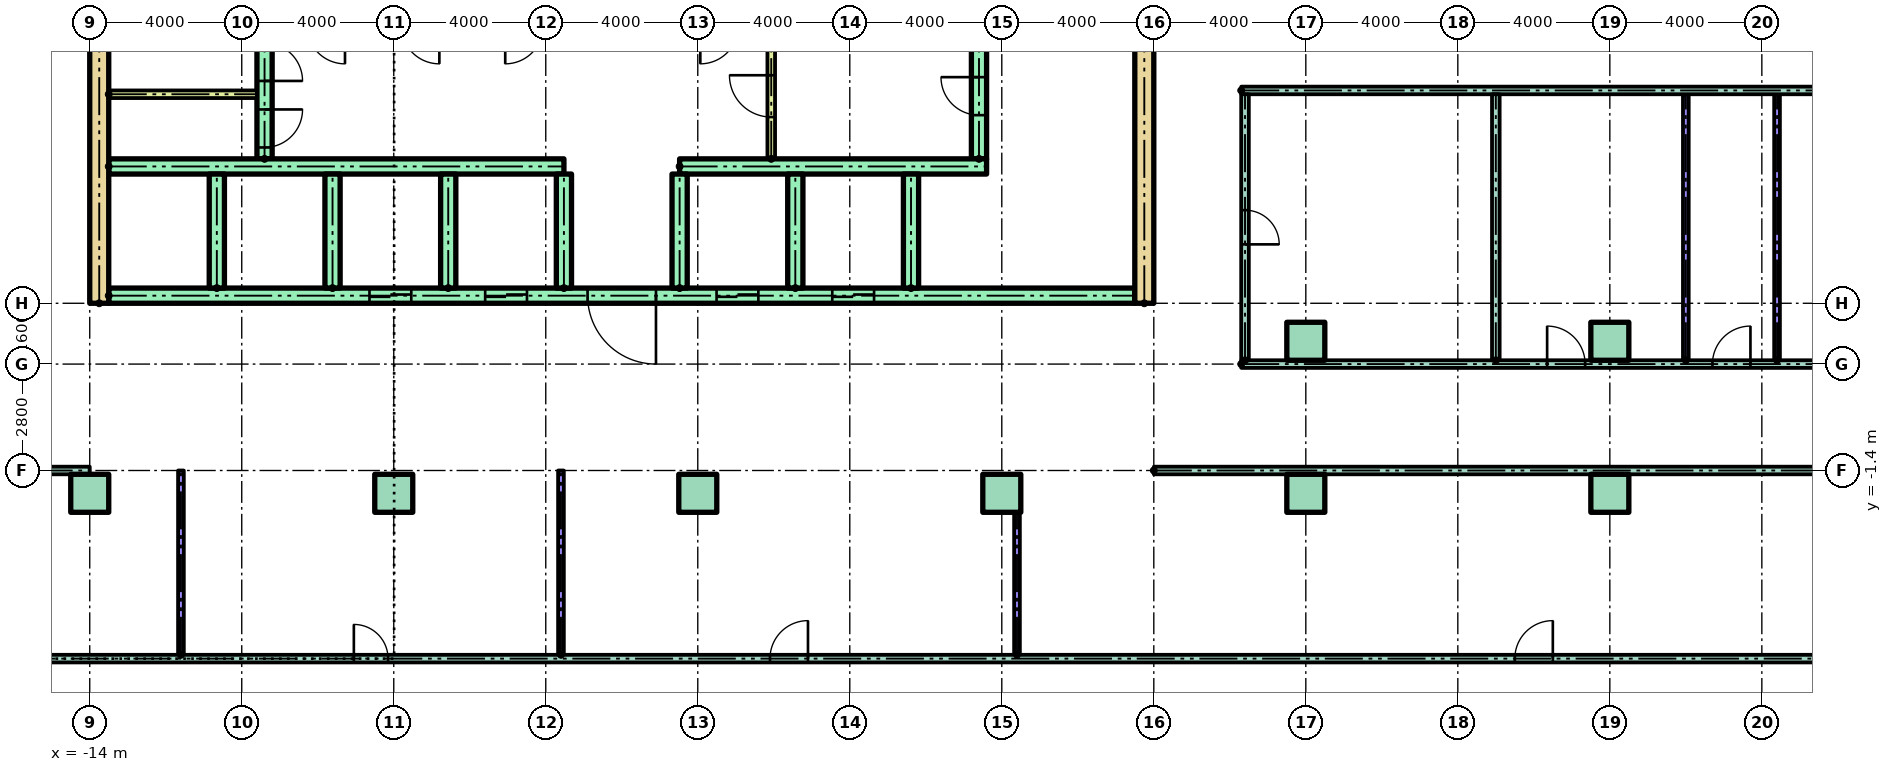
"""IFC4 building model, lengths in metres.
Left out: names, types, materials, properties, quantities, classifications, styles, units other than length and angle.
Written with IfcOpenShell. Run it as: python <this file> out.ifc"""

import sys

from ifc_helpers import new_model, si_unit, direction, frame, frame_2d, origin, origin_2d, place, context, subcontext, project, spatial, rectangle, extrude, element, fill, save


model = new_model("IFC4")
c1 = context("Model", 3, precision=1e-05, world=origin(), true_north=direction((0.0, 1.0)))
c2 = subcontext(c1, "Body", "Model", "MODEL_VIEW")
j1 = project(units=[si_unit("LENGTHUNIT", "METRE"), si_unit("PLANEANGLEUNIT", "RADIAN")], contexts=[c1])
p1 = place(None, origin())
s1 = spatial("IfcSite", under=j1, at=p1, CompositionType="ELEMENT")
p2 = place(p1, origin())
s2 = spatial("IfcBuilding", under=s1, at=p2, CompositionType="ELEMENT")
p3 = place(p2, frame((0.0, 0.0, 18.0)))
s3 = spatial("IfcBuildingStorey", under=s2, at=p3, CompositionType="ELEMENT", Elevation=18.0)
for number, where in (
    (1, (-14.0, -2.0, 0.0)),
    (2, (-6.0, -2.0, 0.0)),
    (3, (2.0, -2.0, 0.0)),
    (4, (10.0, -2.0, 0.0)),
    (5, (18.0, -2.0, 0.0)),
    (6, (26.0, -2.0, 0.0)),
    (7, (18.0, 2.0, 0.0)),
    (8, (26.0, 2.0, 0.0)),
):
    element("IfcColumn", number, at=place(p3, frame(where)), inside=s3, PredefinedType="COLUMN", context=c2, shape_type="SweptSolid", body=[
        extrude(rectangle(XDim=1.0, YDim=1.0, at=origin_2d()), origin(), (0.0, 0.0, 1.0), 4.0),
    ])
for number, where, z_axis, x_axis in (
    (9, (-13.75, 3.0, 0.0), (0.0, 0.0, 1.0), (0.0, 1.0, 0.0)),
    (10, (13.75, 3.0, 0.0), (0.0, 0.0, 1.0), (0.0, 1.0, 0.0)),
):
    element("IfcWall", number, at=place(p3, frame(where, z_axis=z_axis, x_axis=x_axis)), inside=s3, PredefinedType="SHEAR", context=c2, shape_type="SweptSolid", body=[
        extrude(rectangle(XDim=17.0, YDim=0.5, at=frame_2d((8.5, 0.0))), origin(), (0.0, 0.0, 1.0), 3.7),
    ])
p4 = place(p3, frame((-9.4, 6.8, 0.0), z_axis=(0.0, 0.0, 1.0), x_axis=(0.0, 1.0, 0.0)))
e11 = element("IfcWall", 11, at=p4, inside=s3, PredefinedType="SHEAR", context=c2, shape_type="SweptSolid", body=[
    extrude(rectangle(XDim=12.7, YDim=0.4, at=frame_2d((6.35, 0.0))), origin(), (0.0, 0.0, 1.0), 3.7),
])
p5 = place(p4, frame((0.3, 0.0, 0.0)))
e12 = element("IfcOpeningElement", 12, at=p5, cuts=e11, PredefinedType="OPENING", context=c2, shape_type="SweptSolid", body=[
    extrude(rectangle(XDim=1.0, YDim=2.1, at=frame_2d((0.5, 1.05))), frame((0.0, 0.21, 0.0), z_axis=(0.0, -1.0, 0.0), x_axis=(1.0, 0.0, 0.0)), (0.0, 0.0, 1.0), 0.42),
])
p6 = place(p4, frame((2.05, 0.0, 0.0)))
e13 = element("IfcOpeningElement", 13, at=p6, cuts=e11, PredefinedType="OPENING", context=c2, shape_type="SweptSolid", body=[
    extrude(rectangle(XDim=1.0, YDim=2.1, at=frame_2d((0.5, 1.05))), frame((0.0, 0.21, 0.0), z_axis=(0.0, -1.0, 0.0), x_axis=(1.0, 0.0, 0.0)), (0.0, 0.0, 1.0), 0.42),
])
p7 = place(p4, frame((7.925, 0.0, 0.0)))
e14 = element("IfcOpeningElement", 14, at=p7, cuts=e11, PredefinedType="OPENING", context=c2, shape_type="SweptSolid", body=[
    extrude(rectangle(XDim=1.0, YDim=2.1, at=frame_2d((0.5, 1.05))), frame((0.0, 0.21, 0.0), z_axis=(0.0, -1.0, 0.0), x_axis=(1.0, 0.0, 0.0)), (0.0, 0.0, 1.0), 0.42),
])
p8 = place(p3, frame((9.4, 6.8, 0.0), z_axis=(0.0, 0.0, 1.0), x_axis=(0.0, 1.0, 0.0)))
e15 = element("IfcWall", 15, at=p8, inside=s3, PredefinedType="SHEAR", context=c2, shape_type="SweptSolid", body=[
    extrude(rectangle(XDim=12.7, YDim=0.4, at=frame_2d((6.35, 0.0))), origin(), (0.0, 0.0, 1.0), 3.7),
])
p9 = place(p8, frame((1.15, 0.0, 0.0)))
e16 = element("IfcOpeningElement", 16, at=p9, cuts=e15, PredefinedType="OPENING", context=c2, shape_type="SweptSolid", body=[
    extrude(rectangle(XDim=1.0, YDim=2.1, at=frame_2d((0.5, 1.05))), frame((0.0, 0.21, 0.0), z_axis=(0.0, -1.0, 0.0), x_axis=(1.0, 0.0, 0.0)), (0.0, 0.0, 1.0), 0.42),
])
p10 = place(p8, frame((7.925, 0.0, 0.0)))
e17 = element("IfcOpeningElement", 17, at=p10, cuts=e15, PredefinedType="OPENING", context=c2, shape_type="SweptSolid", body=[
    extrude(rectangle(XDim=1.0, YDim=2.1, at=frame_2d((0.5, 1.05))), frame((0.0, 0.21, 0.0), z_axis=(0.0, -1.0, 0.0), x_axis=(1.0, 0.0, 0.0)), (0.0, 0.0, 1.0), 0.42),
])
p11 = place(p3, frame((-13.5, 3.2, 0.0)))
e18 = element("IfcWall", 18, at=p11, inside=s3, PredefinedType="SHEAR", context=c2, shape_type="SweptSolid", body=[
    extrude(rectangle(XDim=27.0, YDim=0.4, at=frame_2d((13.5, 0.0))), origin(), (0.0, 0.0, 1.0), 3.7),
])
p12 = place(p11, frame((6.861, 0.0, 0.0)))
e19 = element("IfcOpeningElement", 19, at=p12, cuts=e18, PredefinedType="OPENING", context=c2, shape_type="SweptSolid", body=[
    extrude(rectangle(XDim=1.1, YDim=2.1, at=frame_2d((0.55, 1.05))), frame((0.0, 0.21, 0.0), z_axis=(0.0, -1.0, 0.0), x_axis=(1.0, 0.0, 0.0)), (0.0, 0.0, 1.0), 0.42),
])
p13 = place(p11, frame((9.906, 0.0, 0.0)))
e20 = element("IfcOpeningElement", 20, at=p13, cuts=e18, PredefinedType="OPENING", context=c2, shape_type="SweptSolid", body=[
    extrude(rectangle(XDim=1.1, YDim=2.1, at=frame_2d((0.55, 1.05))), frame((0.0, 0.21, 0.0), z_axis=(0.0, -1.0, 0.0), x_axis=(1.0, 0.0, 0.0)), (0.0, 0.0, 1.0), 0.42),
])
p14 = place(p11, frame((15.994, 0.0, 0.0)))
e21 = element("IfcOpeningElement", 21, at=p14, cuts=e18, PredefinedType="OPENING", context=c2, shape_type="SweptSolid", body=[
    extrude(rectangle(XDim=1.1, YDim=2.1, at=frame_2d((0.55, 1.05))), frame((0.0, 0.21, 0.0), z_axis=(0.0, -1.0, 0.0), x_axis=(1.0, 0.0, 0.0)), (0.0, 0.0, 1.0), 0.42),
])
p15 = place(p11, frame((19.039, 0.0, 0.0)))
e22 = element("IfcOpeningElement", 22, at=p15, cuts=e18, PredefinedType="OPENING", context=c2, shape_type="SweptSolid", body=[
    extrude(rectangle(XDim=1.1, YDim=2.1, at=frame_2d((0.55, 1.05))), frame((0.0, 0.21, 0.0), z_axis=(0.0, -1.0, 0.0), x_axis=(1.0, 0.0, 0.0)), (0.0, 0.0, 1.0), 0.42),
])
p16 = place(p11, frame((12.6, 0.0, 0.0)))
e23 = element("IfcOpeningElement", 23, at=p16, cuts=e18, PredefinedType="OPENING", context=c2, shape_type="SweptSolid", body=[
    extrude(rectangle(XDim=1.8, YDim=2.1, at=frame_2d((0.9, 1.05))), frame((0.0, 0.21, 0.0), z_axis=(0.0, -1.0, 0.0), x_axis=(1.0, 0.0, 0.0)), (0.0, 0.0, 1.0), 0.42),
])
p17 = place(p3, frame((-13.5, 6.6, 0.0)))
e24 = element("IfcWall", 24, at=p17, inside=s3, PredefinedType="SHEAR", context=c2, shape_type="SweptSolid", body=[
    extrude(rectangle(XDim=11.978, YDim=0.4, at=frame_2d((5.989, 0.0))), origin(), (0.0, 0.0, 1.0), 3.7),
])
p18 = place(p3, frame((1.522, 6.6, 0.0)))
e25 = element("IfcWall", 25, at=p18, inside=s3, PredefinedType="SHEAR", context=c2, shape_type="SweptSolid", body=[
    extrude(rectangle(XDim=8.078, YDim=0.4, at=frame_2d((4.039, 0.0))), origin(), (0.0, 0.0, 1.0), 3.7),
])
for number, where, z_axis, x_axis in (
    (26, (-10.656, 3.4, 0.0), (0.0, 0.0, 1.0), (0.0, 1.0, 0.0)),
    (27, (-7.611, 3.4, 0.0), (0.0, 0.0, 1.0), (0.0, 1.0, 0.0)),
    (28, (-4.567, 3.4, 0.0), (0.0, 0.0, 1.0), (0.0, 1.0, 0.0)),
    (29, (-1.522, 3.4, 0.0), (0.0, 0.0, 1.0), (0.0, 1.0, 0.0)),
    (30, (1.522, 3.4, 0.0), (0.0, 0.0, 1.0), (0.0, 1.0, 0.0)),
    (31, (4.567, 3.4, 0.0), (0.0, 0.0, 1.0), (0.0, 1.0, 0.0)),
    (32, (7.611, 3.4, 0.0), (0.0, 0.0, 1.0), (0.0, 1.0, 0.0)),
):
    element("IfcWall", number, at=place(p3, frame(where, z_axis=z_axis, x_axis=x_axis)), inside=s3, PredefinedType="SHEAR", context=c2, shape_type="SweptSolid", body=[
        extrude(rectangle(XDim=3.0, YDim=0.4, at=frame_2d((1.5, 0.0))), origin(), (0.0, 0.0, 1.0), 3.7),
    ])
p19 = place(p3, frame((3.933, 6.8, 0.0), z_axis=(0.0, 0.0, 1.0), x_axis=(0.0, 1.0, 0.0)))
e33 = element("IfcWall", 33, at=p19, inside=s3, PredefinedType="PARTITIONING", context=c2, shape_type="SweptSolid", body=[
    extrude(rectangle(XDim=3.3, YDim=0.2, at=frame_2d((1.65, 0.0))), origin(), (0.0, 0.0, 1.0), 3.7),
])
p20 = place(p19, frame((1.1, 0.0, 0.0)))
e34 = element("IfcOpeningElement", 34, at=p20, cuts=e33, PredefinedType="OPENING", context=c2, shape_type="SweptSolid", body=[
    extrude(rectangle(XDim=1.1, YDim=2.1, at=frame_2d((0.55, 1.05))), frame((0.0, 0.11, 0.0), z_axis=(0.0, -1.0, 0.0), x_axis=(1.0, 0.0, 0.0)), (0.0, 0.0, 1.0), 0.22),
])
p21 = place(p3, frame((-13.5, 8.5, 0.0)))
e35 = element("IfcWall", 35, at=p21, inside=s3, PredefinedType="PARTITIONING", context=c2, shape_type="SweptSolid", body=[
    extrude(rectangle(XDim=3.9, YDim=0.2, at=frame_2d((1.95, 0.0))), origin(), (0.0, 0.0, 1.0), 3.7),
])
p22 = place(p3, frame((-37.6, -6.35, 0.0)))
e36 = element("IfcWall", 36, at=p22, inside=s3, PredefinedType="PARTITIONING", context=c2, shape_type="SweptSolid", body=[
    extrude(rectangle(XDim=75.2, YDim=0.2, at=frame_2d((37.6, 0.0))), origin(), (0.0, 0.0, 1.0), 3.7),
])
p23 = place(p22, frame((7.5, 0.0, 0.0)))
e37 = element("IfcOpeningElement", 37, at=p23, cuts=e36, PredefinedType="OPENING", context=c2, shape_type="SweptSolid", body=[
    extrude(rectangle(XDim=1.0, YDim=2.1, at=frame_2d((0.5, 1.05))), frame((0.0, 0.11, 0.0), z_axis=(0.0, -1.0, 0.0), x_axis=(1.0, 0.0, 0.0)), (0.0, 0.0, 1.0), 0.22),
])
p24 = place(p22, frame((20.55, 0.0, 0.0)))
e38 = element("IfcOpeningElement", 38, at=p24, cuts=e36, PredefinedType="OPENING", context=c2, shape_type="SweptSolid", body=[
    extrude(rectangle(XDim=0.9, YDim=2.1, at=frame_2d((0.45, 1.05))), frame((0.0, 0.11, 0.0), z_axis=(0.0, -1.0, 0.0), x_axis=(1.0, 0.0, 0.0)), (0.0, 0.0, 1.0), 0.22),
])
p25 = place(p22, frame((30.55, 0.0, 0.0)))
e39 = element("IfcOpeningElement", 39, at=p25, cuts=e36, PredefinedType="OPENING", context=c2, shape_type="SweptSolid", body=[
    extrude(rectangle(XDim=0.9, YDim=2.1, at=frame_2d((0.45, 1.05))), frame((0.0, 0.11, 0.0), z_axis=(0.0, -1.0, 0.0), x_axis=(1.0, 0.0, 0.0)), (0.0, 0.0, 1.0), 0.22),
])
p26 = place(p22, frame((41.5, 0.0, 0.0)))
e40 = element("IfcOpeningElement", 40, at=p26, cuts=e36, PredefinedType="OPENING", context=c2, shape_type="SweptSolid", body=[
    extrude(rectangle(XDim=1.0, YDim=2.1, at=frame_2d((0.5, 1.05))), frame((0.0, 0.11, 0.0), z_axis=(0.0, -1.0, 0.0), x_axis=(1.0, 0.0, 0.0)), (0.0, 0.0, 1.0), 0.22),
])
p27 = place(p22, frame((61.1, 0.0, 0.0)))
e41 = element("IfcOpeningElement", 41, at=p27, cuts=e36, PredefinedType="OPENING", context=c2, shape_type="SweptSolid", body=[
    extrude(rectangle(XDim=1.0, YDim=2.1, at=frame_2d((0.5, 1.05))), frame((0.0, 0.11, 0.0), z_axis=(0.0, -1.0, 0.0), x_axis=(1.0, 0.0, 0.0)), (0.0, 0.0, 1.0), 0.22),
])
for number, where in (
    (42, (-36.9, -1.4, 0.0)),
    (43, (14.0, -1.4, 0.0)),
):
    element("IfcWall", number, at=place(p3, frame(where)), inside=s3, PredefinedType="PARTITIONING", context=c2, shape_type="SweptSolid", body=[
        extrude(rectangle(XDim=22.9, YDim=0.2, at=frame_2d((11.45, 0.0))), origin(), (0.0, 0.0, 1.0), 3.7),
    ])
p28 = place(p3, frame((16.3, 1.4, 0.0)))
e44 = element("IfcWall", 44, at=p28, inside=s3, PredefinedType="PARTITIONING", context=c2, shape_type="SweptSolid", body=[
    extrude(rectangle(XDim=20.6, YDim=0.2, at=frame_2d((10.3, 0.0))), origin(), (0.0, 0.0, 1.0), 3.7),
])
p29 = place(p28, frame((8.05, 0.0, 0.0)))
e45 = element("IfcOpeningElement", 45, at=p29, cuts=e44, PredefinedType="OPENING", context=c2, shape_type="SweptSolid", body=[
    extrude(rectangle(XDim=1.0, YDim=2.1, at=frame_2d((0.5, 1.05))), frame((0.0, 0.11, 0.0), z_axis=(0.0, -1.0, 0.0), x_axis=(1.0, 0.0, 0.0)), (0.0, 0.0, 1.0), 0.22),
])
p30 = place(p28, frame((12.4, 0.0, 0.0)))
e46 = element("IfcOpeningElement", 46, at=p30, cuts=e44, PredefinedType="OPENING", context=c2, shape_type="SweptSolid", body=[
    extrude(rectangle(XDim=1.0, YDim=2.1, at=frame_2d((0.5, 1.05))), frame((0.0, 0.11, 0.0), z_axis=(0.0, -1.0, 0.0), x_axis=(1.0, 0.0, 0.0)), (0.0, 0.0, 1.0), 0.22),
])
p31 = place(p28, frame((16.05, 0.0, 0.0)))
e47 = element("IfcOpeningElement", 47, at=p31, cuts=e44, PredefinedType="OPENING", context=c2, shape_type="SweptSolid", body=[
    extrude(rectangle(XDim=1.0, YDim=2.1, at=frame_2d((0.5, 1.05))), frame((0.0, 0.11, 0.0), z_axis=(0.0, -1.0, 0.0), x_axis=(1.0, 0.0, 0.0)), (0.0, 0.0, 1.0), 0.22),
])
p32 = place(p3, frame((16.3, 8.6, 0.0)))
e48 = element("IfcWall", 48, at=p32, inside=s3, PredefinedType="PARTITIONING", context=c2, shape_type="SweptSolid", body=[
    extrude(rectangle(XDim=21.3, YDim=0.2, at=frame_2d((10.65, 0.0))), origin(), (0.0, 0.0, 1.0), 3.7),
])
for number, where, z_axis, x_axis in (
    (49, (-11.6, -6.25, 0.0), (0.0, 0.0, 1.0), (0.0, 1.0, 0.0)),
    (50, (-1.6, -6.25, 0.0), (0.0, 0.0, 1.0), (0.0, 1.0, 0.0)),
):
    element("IfcWall", number, at=place(p3, frame(where, z_axis=z_axis, x_axis=x_axis)), inside=s3, PredefinedType="PARTITIONING", context=c2, shape_type="SweptSolid", body=[
        extrude(rectangle(XDim=4.85, YDim=0.15, at=frame_2d((2.425, 0.0))), origin(), (0.0, 0.0, 1.0), 3.7),
    ])
p33 = place(p3, frame((10.4, -6.25, 0.0), z_axis=(0.0, 0.0, 1.0), x_axis=(0.0, 1.0, 0.0)))
e51 = element("IfcWall", 51, at=p33, inside=s3, PredefinedType="PARTITIONING", context=c2, shape_type="SweptSolid", body=[
    extrude(rectangle(XDim=3.75, YDim=0.15, at=frame_2d((1.875, 0.0))), origin(), (0.0, 0.0, 1.0), 3.7),
])
p34 = place(p3, frame((16.4, 1.5, 0.0), z_axis=(0.0, 0.0, 1.0), x_axis=(0.0, 1.0, 0.0)))
e52 = element("IfcWall", 52, at=p34, inside=s3, PredefinedType="PARTITIONING", context=c2, shape_type="SweptSolid", body=[
    extrude(rectangle(XDim=7.0, YDim=0.2, at=frame_2d((3.5, 0.0))), origin(), (0.0, 0.0, 1.0), 3.7),
])
p35 = place(p34, frame((3.05, 0.0, 0.0)))
e53 = element("IfcOpeningElement", 53, at=p35, cuts=e52, PredefinedType="OPENING", context=c2, shape_type="SweptSolid", body=[
    extrude(rectangle(XDim=0.9, YDim=2.1, at=frame_2d((0.45, 1.05))), frame((0.0, 0.11, 0.0), z_axis=(0.0, -1.0, 0.0), x_axis=(1.0, 0.0, 0.0)), (0.0, 0.0, 1.0), 0.22),
])
p36 = place(p3, frame((23.0, 1.5, 0.0), z_axis=(0.0, 0.0, 1.0), x_axis=(0.0, 1.0, 0.0)))
e54 = element("IfcWall", 54, at=p36, inside=s3, PredefinedType="PARTITIONING", context=c2, shape_type="SweptSolid", body=[
    extrude(rectangle(XDim=7.0, YDim=0.2, at=frame_2d((3.5, 0.0))), origin(), (0.0, 0.0, 1.0), 3.7),
])
for number, where, z_axis, x_axis in (
    (55, (28.0, 1.5, 0.0), (0.0, 0.0, 1.0), (0.0, 1.0, 0.0)),
    (56, (30.4, 1.5, 0.0), (0.0, 0.0, 1.0), (0.0, 1.0, 0.0)),
):
    element("IfcWall", number, at=place(p3, frame(where, z_axis=z_axis, x_axis=x_axis)), inside=s3, PredefinedType="PARTITIONING", context=c2, shape_type="SweptSolid", body=[
        extrude(rectangle(XDim=7.0, YDim=0.15, at=frame_2d((3.5, 0.0))), origin(), (0.0, 0.0, 1.0), 3.7),
    ])
p37 = place(p12, origin())
e57 = element("IfcDoor", 57, at=p37, inside=s3, OperationType="SLIDING_TO_LEFT", PredefinedType="DOOR", context=c2, shape_type="SweptSolid", body=[
    extrude(rectangle(XDim=1.1, YDim=2.1, at=frame_2d((0.55, 1.05))), frame((0.0, 0.025, 0.0), z_axis=(0.0, -1.0, 0.0), x_axis=(1.0, 0.0, 0.0)), (0.0, 0.0, 1.0), 0.05),
])
fill(e19, e57)
p38 = place(p13, origin())
e58 = element("IfcDoor", 58, at=p38, inside=s3, OperationType="SLIDING_TO_LEFT", PredefinedType="DOOR", context=c2, shape_type="SweptSolid", body=[
    extrude(rectangle(XDim=1.1, YDim=2.1, at=frame_2d((0.55, 1.05))), frame((0.0, 0.025, 0.0), z_axis=(0.0, -1.0, 0.0), x_axis=(1.0, 0.0, 0.0)), (0.0, 0.0, 1.0), 0.05),
])
fill(e20, e58)
p39 = place(p14, origin())
e59 = element("IfcDoor", 59, at=p39, inside=s3, OperationType="SLIDING_TO_LEFT", PredefinedType="DOOR", context=c2, shape_type="SweptSolid", body=[
    extrude(rectangle(XDim=1.1, YDim=2.1, at=frame_2d((0.55, 1.05))), frame((0.0, 0.025, 0.0), z_axis=(0.0, -1.0, 0.0), x_axis=(1.0, 0.0, 0.0)), (0.0, 0.0, 1.0), 0.05),
])
fill(e21, e59)
p40 = place(p15, origin())
e60 = element("IfcDoor", 60, at=p40, inside=s3, OperationType="SLIDING_TO_LEFT", PredefinedType="DOOR", context=c2, shape_type="SweptSolid", body=[
    extrude(rectangle(XDim=1.1, YDim=2.1, at=frame_2d((0.55, 1.05))), frame((0.0, 0.025, 0.0), z_axis=(0.0, -1.0, 0.0), x_axis=(1.0, 0.0, 0.0)), (0.0, 0.0, 1.0), 0.05),
])
fill(e22, e60)
p41 = place(p16, frame((1.8, 0.0, 0.0), z_axis=(0.0, 0.0, 1.0), x_axis=(-1.0, 0.0, 0.0)))
e61 = element("IfcDoor", 61, at=p41, inside=s3, OperationType="DOUBLE_DOOR_SINGLE_SWING", PredefinedType="DOOR", context=c2, shape_type="SweptSolid", body=[
    extrude(rectangle(XDim=1.8, YDim=2.1, at=frame_2d((0.9, 1.05))), frame((0.0, 0.025, 0.0), z_axis=(0.0, -1.0, 0.0), x_axis=(1.0, 0.0, 0.0)), (0.0, 0.0, 1.0), 0.05),
])
fill(e23, e61)
p42 = place(p20, origin())
e62 = element("IfcDoor", 62, at=p42, inside=s3, OperationType="SINGLE_SWING_RIGHT", PredefinedType="DOOR", context=c2, shape_type="SweptSolid", body=[
    extrude(rectangle(XDim=1.1, YDim=2.1, at=frame_2d((0.55, 1.05))), frame((0.0, 0.025, 0.0), z_axis=(0.0, -1.0, 0.0), x_axis=(1.0, 0.0, 0.0)), (0.0, 0.0, 1.0), 0.05),
])
fill(e34, e62)
p43 = place(p5, frame((1.0, 0.0, 0.0), z_axis=(0.0, 0.0, 1.0), x_axis=(-1.0, 0.0, 0.0)))
e63 = element("IfcDoor", 63, at=p43, inside=s3, OperationType="SINGLE_SWING_RIGHT", PredefinedType="DOOR", context=c2, shape_type="SweptSolid", body=[
    extrude(rectangle(XDim=1.0, YDim=2.1, at=frame_2d((0.5, 1.05))), frame((0.0, 0.025, 0.0), z_axis=(0.0, -1.0, 0.0), x_axis=(1.0, 0.0, 0.0)), (0.0, 0.0, 1.0), 0.05),
])
fill(e12, e63)
p44 = place(p6, frame((1.0, 0.0, 0.0), z_axis=(0.0, 0.0, 1.0), x_axis=(-1.0, 0.0, 0.0)))
e64 = element("IfcDoor", 64, at=p44, inside=s3, OperationType="SINGLE_SWING_LEFT", PredefinedType="DOOR", context=c2, shape_type="SweptSolid", body=[
    extrude(rectangle(XDim=1.0, YDim=2.1, at=frame_2d((0.5, 1.05))), frame((0.0, 0.025, 0.0), z_axis=(0.0, -1.0, 0.0), x_axis=(1.0, 0.0, 0.0)), (0.0, 0.0, 1.0), 0.05),
])
fill(e13, e64)
p45 = place(p9, origin())
e65 = element("IfcDoor", 65, at=p45, inside=s3, OperationType="SINGLE_SWING_RIGHT", PredefinedType="DOOR", context=c2, shape_type="SweptSolid", body=[
    extrude(rectangle(XDim=1.0, YDim=2.1, at=frame_2d((0.5, 1.05))), frame((0.0, 0.025, 0.0), z_axis=(0.0, -1.0, 0.0), x_axis=(1.0, 0.0, 0.0)), (0.0, 0.0, 1.0), 0.05),
])
fill(e16, e65)
p46 = place(p25, origin())
e66 = element("IfcDoor", 66, at=p46, inside=s3, OperationType="SINGLE_SWING_LEFT", PredefinedType="DOOR", context=c2, shape_type="SweptSolid", body=[
    extrude(rectangle(XDim=0.9, YDim=2.1, at=frame_2d((0.45, 1.05))), frame((0.0, 0.025, 0.0), z_axis=(0.0, -1.0, 0.0), x_axis=(1.0, 0.0, 0.0)), (0.0, 0.0, 1.0), 0.05),
])
fill(e39, e66)
p47 = place(p26, origin())
e67 = element("IfcDoor", 67, at=p47, inside=s3, OperationType="SINGLE_SWING_RIGHT", PredefinedType="DOOR", context=c2, shape_type="SweptSolid", body=[
    extrude(rectangle(XDim=1.0, YDim=2.1, at=frame_2d((0.5, 1.05))), frame((0.0, 0.025, 0.0), z_axis=(0.0, -1.0, 0.0), x_axis=(1.0, 0.0, 0.0)), (0.0, 0.0, 1.0), 0.05),
])
fill(e40, e67)
p48 = place(p27, origin())
e68 = element("IfcDoor", 68, at=p48, inside=s3, OperationType="SINGLE_SWING_RIGHT", PredefinedType="DOOR", context=c2, shape_type="SweptSolid", body=[
    extrude(rectangle(XDim=1.0, YDim=2.1, at=frame_2d((0.5, 1.05))), frame((0.0, 0.025, 0.0), z_axis=(0.0, -1.0, 0.0), x_axis=(1.0, 0.0, 0.0)), (0.0, 0.0, 1.0), 0.05),
])
fill(e41, e68)
p49 = place(p35, frame((0.9, 0.0, 0.0), z_axis=(0.0, 0.0, 1.0), x_axis=(-1.0, 0.0, 0.0)))
e69 = element("IfcDoor", 69, at=p49, inside=s3, OperationType="SINGLE_SWING_LEFT", PredefinedType="DOOR", context=c2, shape_type="SweptSolid", body=[
    extrude(rectangle(XDim=0.9, YDim=2.1, at=frame_2d((0.45, 1.05))), frame((0.0, 0.025, 0.0), z_axis=(0.0, -1.0, 0.0), x_axis=(1.0, 0.0, 0.0)), (0.0, 0.0, 1.0), 0.05),
])
fill(e53, e69)
p50 = place(p29, origin())
e70 = element("IfcDoor", 70, at=p50, inside=s3, OperationType="SINGLE_SWING_LEFT", PredefinedType="DOOR", context=c2, shape_type="SweptSolid", body=[
    extrude(rectangle(XDim=1.0, YDim=2.1, at=frame_2d((0.5, 1.05))), frame((0.0, 0.025, 0.0), z_axis=(0.0, -1.0, 0.0), x_axis=(1.0, 0.0, 0.0)), (0.0, 0.0, 1.0), 0.05),
])
fill(e45, e70)
p51 = place(p30, origin())
e71 = element("IfcDoor", 71, at=p51, inside=s3, OperationType="SINGLE_SWING_RIGHT", PredefinedType="DOOR", context=c2, shape_type="SweptSolid", body=[
    extrude(rectangle(XDim=1.0, YDim=2.1, at=frame_2d((0.5, 1.05))), frame((0.0, 0.025, 0.0), z_axis=(0.0, -1.0, 0.0), x_axis=(1.0, 0.0, 0.0)), (0.0, 0.0, 1.0), 0.05),
])
fill(e46, e71)
save(model, sys.argv[1])
